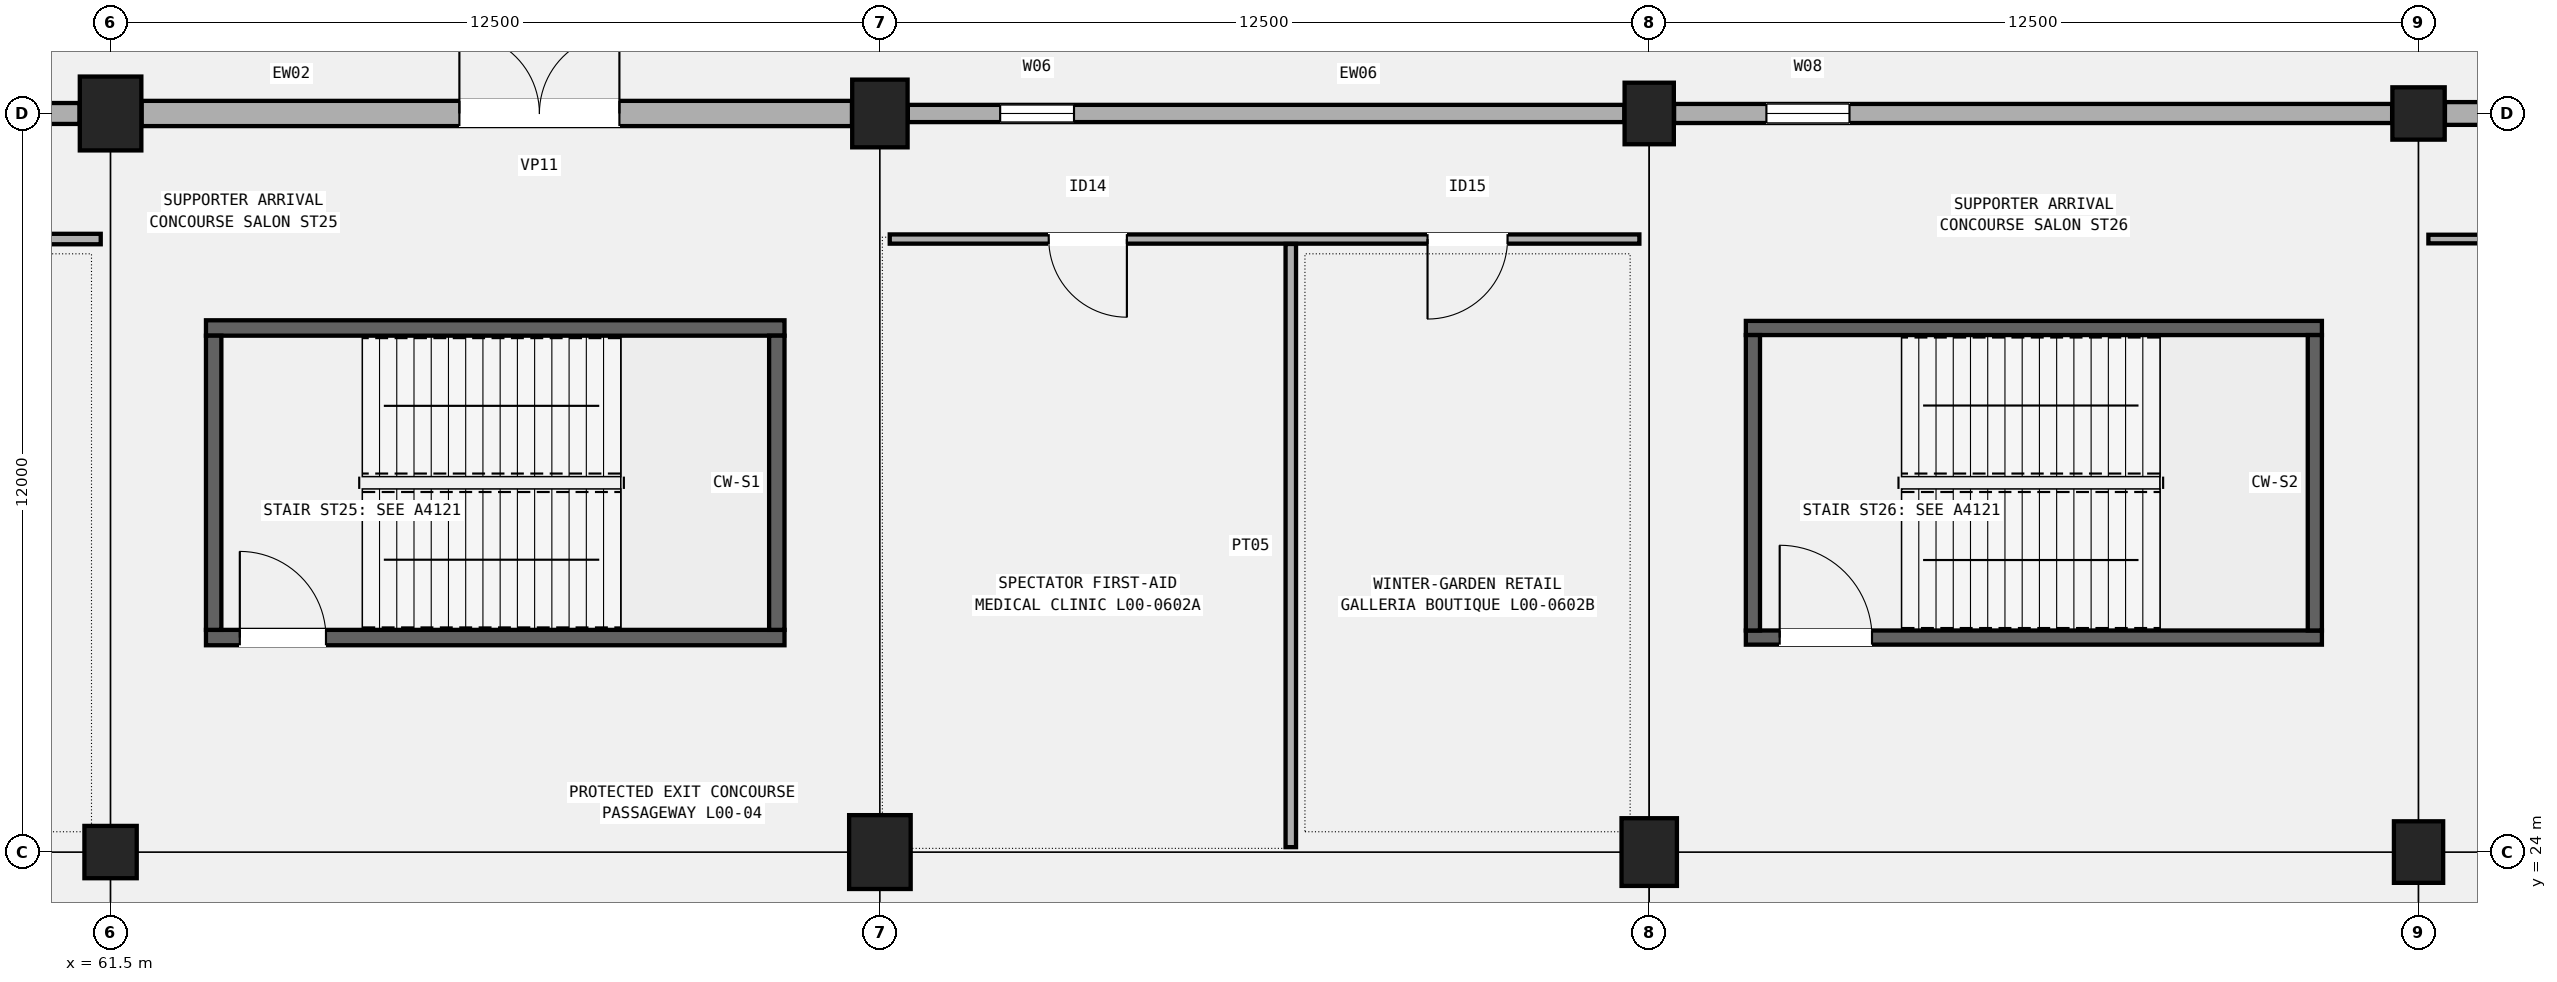
"""IFC4 building model, lengths in metres.
Left out: names, types, materials, properties, quantities, classifications, styles, units other than length and angle.
Written with IfcOpenShell. Run it as: python <this file> out.ifc"""

import sys

from ifc_helpers import new_model, si_unit, direction, frame, frame_2d, origin, origin_2d, place, context, subcontext, project, spatial, rectangle, circle, extrude, element, fill, save


model = new_model("IFC4")
c1 = context("Model", 3, precision=1e-05, world=origin(), true_north=direction((0.0, 1.0)))
c2 = subcontext(c1, "Body", "Model", "MODEL_VIEW")
j1 = project(units=[si_unit("LENGTHUNIT", "METRE"), si_unit("PLANEANGLEUNIT", "RADIAN")], contexts=[c1])
p1 = place(None, origin())
s1 = spatial("IfcSite", under=j1, at=p1, CompositionType="ELEMENT")
p2 = place(p1, origin())
s2 = spatial("IfcBuilding", under=s1, at=p2, CompositionType="ELEMENT")
p3 = place(p2, origin())
s3 = spatial("IfcBuildingStorey", under=s2, at=p3, CompositionType="ELEMENT", Elevation=0.0)
p4 = place(p3, frame((61.5, 24.0, 0.0), z_axis=(0.0, 0.0, 1.0), x_axis=(1.0, 0.0, 0.0)))
e1 = element("IfcColumn", 1, at=p4, inside=s3, PredefinedType="COLUMN", context=c2, shape_type="SweptSolid", body=[
    extrude(circle(Radius=0.425, at=origin_2d()), origin(), (0.0, 0.0, 1.0), 5.4),
])
for number, where, z_axis, x_axis in (
    (2, (61.5, 36.0, 0.0), (0.0, 0.0, 1.0), (1.0, 0.0, 0.0)),
    (3, (74.0, 24.0, 0.0), (0.0, 0.0, 1.0), (1.0, 0.0, 0.0)),
):
    element("IfcColumn", number, at=place(p3, frame(where, z_axis=z_axis, x_axis=x_axis)), inside=s3, PredefinedType="COLUMN", context=c2, shape_type="SweptSolid", body=[
        extrude(rectangle(XDim=1.0, YDim=1.2, at=origin_2d()), origin(), (0.0, 0.0, 1.0), 5.4),
    ])
for number, where, z_axis, x_axis in (
    (4, (74.0, 36.0, 0.0), (0.0, 0.0, 1.0), (1.0, 0.0, 0.0)),
    (5, (86.5, 24.0, 0.0), (0.0, 0.0, 1.0), (1.0, 0.0, 0.0)),
):
    element("IfcColumn", number, at=place(p3, frame(where, z_axis=z_axis, x_axis=x_axis)), inside=s3, PredefinedType="COLUMN", context=c2, shape_type="SweptSolid", body=[
        extrude(rectangle(XDim=0.9, YDim=1.1, at=origin_2d()), origin(), (0.0, 0.0, 1.0), 5.4),
    ])
for number, where, z_axis, x_axis in (
    (6, (86.5, 36.0, 0.0), (0.0, 0.0, 1.0), (1.0, 0.0, 0.0)),
    (7, (99.0, 24.0, 0.0), (0.0, 0.0, 1.0), (1.0, 0.0, 0.0)),
):
    element("IfcColumn", number, at=place(p3, frame(where, z_axis=z_axis, x_axis=x_axis)), inside=s3, PredefinedType="COLUMN", context=c2, shape_type="SweptSolid", body=[
        extrude(rectangle(XDim=0.8, YDim=1.0, at=origin_2d()), origin(), (0.0, 0.0, 1.0), 5.4),
    ])
p5 = place(p3, frame((99.0, 36.0, 0.0), z_axis=(0.0, 0.0, 1.0), x_axis=(1.0, 0.0, 0.0)))
e8 = element("IfcColumn", 8, at=p5, inside=s3, PredefinedType="COLUMN", context=c2, shape_type="SweptSolid", body=[
    extrude(circle(Radius=0.425, at=origin_2d()), origin(), (0.0, 0.0, 1.0), 5.4),
])
p6 = place(p3, frame((49.429, 36.0, 0.0), z_axis=(0.0, 0.0, 1.0), x_axis=(1.0, 0.0, 0.0)))
e9 = element("IfcWall", 9, at=p6, inside=s3, PredefinedType="SOLIDWALL", context=c2, shape_type="SweptSolid", body=[
    extrude(rectangle(XDim=11.567, YDim=0.34, at=frame_2d((5.784, 0.0))), origin(), (0.0, 0.0, 1.0), 4.34),
])
p7 = place(p6, frame((5.177, 0.0, 0.0)))
e10 = element("IfcOpeningElement", 10, at=p7, cuts=e9, PredefinedType="OPENING", context=c2, shape_type="SweptSolid", body=[
    extrude(rectangle(XDim=2.6, YDim=2.5, at=frame_2d((1.3, 1.25))), frame((0.0, 0.18, 0.0), z_axis=(0.0, -1.0, 0.0), x_axis=(1.0, 0.0, 0.0)), (0.0, 0.0, 1.0), 0.36),
])
p8 = place(p3, frame((62.004, 36.0, 0.0), z_axis=(0.0, 0.0, 1.0), x_axis=(1.0, 0.0, 0.0)))
e11 = element("IfcWall", 11, at=p8, inside=s3, PredefinedType="SOLIDWALL", context=c2, shape_type="SweptSolid", body=[
    extrude(rectangle(XDim=11.542, YDim=0.41, at=frame_2d((5.771, 0.0))), origin(), (0.0, 0.0, 1.0), 4.09),
])
p9 = place(p8, frame((5.164, 0.0, 0.0)))
e12 = element("IfcOpeningElement", 12, at=p9, cuts=e11, PredefinedType="OPENING", context=c2, shape_type="SweptSolid", body=[
    extrude(rectangle(XDim=2.6, YDim=2.5, at=frame_2d((1.3, 1.25))), frame((0.0, 0.215, 0.0), z_axis=(0.0, -1.0, 0.0), x_axis=(1.0, 0.0, 0.0)), (0.0, 0.0, 1.0), 0.43),
])
p10 = place(p3, frame((74.454, 36.0, 0.0), z_axis=(0.0, 0.0, 1.0), x_axis=(1.0, 0.0, 0.0)))
e13 = element("IfcWall", 13, at=p10, inside=s3, PredefinedType="SOLIDWALL", context=c2, shape_type="SweptSolid", body=[
    extrude(rectangle(XDim=11.642, YDim=0.28, at=frame_2d((5.821, 0.0))), origin(), (0.0, 0.0, 1.0), 4.24),
])
p11 = place(p10, frame((1.5, 0.0, 0.95)))
e14 = element("IfcOpeningElement", 14, at=p11, cuts=e13, PredefinedType="OPENING", context=c2, shape_type="SweptSolid", body=[
    extrude(rectangle(XDim=1.2, YDim=2.3, at=frame_2d((0.6, 1.15))), frame((0.0, 0.15, 0.0), z_axis=(0.0, -1.0, 0.0), x_axis=(1.0, 0.0, 0.0)), (0.0, 0.0, 1.0), 0.3),
])
p12 = place(p3, frame((86.904, 36.0, 0.0), z_axis=(0.0, 0.0, 1.0), x_axis=(1.0, 0.0, 0.0)))
e15 = element("IfcWall", 15, at=p12, inside=s3, PredefinedType="SOLIDWALL", context=c2, shape_type="SweptSolid", body=[
    extrude(rectangle(XDim=11.667, YDim=0.31, at=frame_2d((5.833, 0.0))), origin(), (0.0, 0.0, 1.0), 4.24),
])
p13 = place(p12, frame((1.5, 0.0, 0.95)))
e16 = element("IfcOpeningElement", 16, at=p13, cuts=e15, PredefinedType="OPENING", context=c2, shape_type="SweptSolid", body=[
    extrude(rectangle(XDim=1.35, YDim=2.4, at=frame_2d((0.675, 1.2))), frame((0.0, 0.165, 0.0), z_axis=(0.0, -1.0, 0.0), x_axis=(1.0, 0.0, 0.0)), (0.0, 0.0, 1.0), 0.33),
])
p14 = place(p3, frame((99.429, 36.0, 0.0), z_axis=(0.0, 0.0, 1.0), x_axis=(1.0, 0.0, 0.0)))
e17 = element("IfcWall", 17, at=p14, inside=s3, PredefinedType="SOLIDWALL", context=c2, shape_type="SweptSolid", body=[
    extrude(rectangle(XDim=12.067, YDim=0.37, at=frame_2d((6.034, 0.0))), origin(), (0.0, 0.0, 1.0), 4.34),
])
p15 = place(p14, frame((1.5, 0.0, 0.95)))
e18 = element("IfcOpeningElement", 18, at=p15, cuts=e17, PredefinedType="OPENING", context=c2, shape_type="SweptSolid", body=[
    extrude(rectangle(XDim=1.5, YDim=2.25, at=frame_2d((0.75, 1.125))), frame((0.0, 0.195, 0.0), z_axis=(0.0, -1.0, 0.0), x_axis=(1.0, 0.0, 0.0)), (0.0, 0.0, 1.0), 0.39),
])
p16 = place(p3, frame((63.05, 27.485, 0.0), z_axis=(0.0, 0.0, 1.0), x_axis=(1.0, 0.0, 0.0)))
e19 = element("IfcWall", 19, at=p16, inside=s3, PredefinedType="SHEAR", context=c2, shape_type="SweptSolid", body=[
    extrude(rectangle(XDim=9.4, YDim=0.25, at=frame_2d((4.7, 0.0))), origin(), (0.0, 0.0, 1.0), 5.14),
])
p17 = place(p16, frame((0.55, 0.0, 0.0)))
e20 = element("IfcOpeningElement", 20, at=p17, cuts=e19, PredefinedType="OPENING", context=c2, shape_type="SweptSolid", body=[
    extrude(rectangle(XDim=1.4, YDim=2.15, at=frame_2d((0.7, 1.075))), frame((0.0, 0.135, 0.0), z_axis=(0.0, -1.0, 0.0), x_axis=(1.0, 0.0, 0.0)), (0.0, 0.0, 1.0), 0.27),
])
p18 = place(p3, frame((63.05, 32.515, 0.0), z_axis=(0.0, 0.0, 1.0), x_axis=(1.0, 0.0, 0.0)))
e21 = element("IfcWall", 21, at=p18, inside=s3, PredefinedType="SHEAR", context=c2, shape_type="SweptSolid", body=[
    extrude(rectangle(XDim=9.4, YDim=0.25, at=frame_2d((4.7, 0.0))), origin(), (0.0, 0.0, 1.0), 5.14),
])
for number, where, z_axis, x_axis in (
    (22, (63.175, 27.61, 0.0), (0.0, 0.0, 1.0), (0.0, 1.0, 0.0)),
    (23, (72.325, 27.61, 0.0), (0.0, 0.0, 1.0), (0.0, 1.0, 0.0)),
):
    element("IfcWall", number, at=place(p3, frame(where, z_axis=z_axis, x_axis=x_axis)), inside=s3, PredefinedType="SHEAR", context=c2, shape_type="SweptSolid", body=[
        extrude(rectangle(XDim=4.78, YDim=0.25, at=frame_2d((2.39, 0.0))), origin(), (0.0, 0.0, 1.0), 5.14),
    ])
p19 = place(p3, frame((88.07, 27.485, 0.0), z_axis=(0.0, 0.0, 1.0), x_axis=(1.0, 0.0, 0.0)))
e24 = element("IfcWall", 24, at=p19, inside=s3, PredefinedType="SHEAR", context=c2, shape_type="SweptSolid", body=[
    extrude(rectangle(XDim=9.36, YDim=0.23, at=frame_2d((4.68, 0.0))), origin(), (0.0, 0.0, 1.0), 5.14),
])
p20 = place(p19, frame((0.55, 0.0, 0.0)))
e25 = element("IfcOpeningElement", 25, at=p20, cuts=e24, PredefinedType="OPENING", context=c2, shape_type="SweptSolid", body=[
    extrude(rectangle(XDim=1.5, YDim=2.2, at=frame_2d((0.75, 1.1))), frame((0.0, 0.125, 0.0), z_axis=(0.0, -1.0, 0.0), x_axis=(1.0, 0.0, 0.0)), (0.0, 0.0, 1.0), 0.25),
])
p21 = place(p3, frame((88.07, 32.515, 0.0), z_axis=(0.0, 0.0, 1.0), x_axis=(1.0, 0.0, 0.0)))
e26 = element("IfcWall", 26, at=p21, inside=s3, PredefinedType="SHEAR", context=c2, shape_type="SweptSolid", body=[
    extrude(rectangle(XDim=9.36, YDim=0.23, at=frame_2d((4.68, 0.0))), origin(), (0.0, 0.0, 1.0), 5.14),
])
for number, where, z_axis, x_axis in (
    (27, (88.185, 27.6, 0.0), (0.0, 0.0, 1.0), (0.0, 1.0, 0.0)),
    (28, (97.315, 27.6, 0.0), (0.0, 0.0, 1.0), (0.0, 1.0, 0.0)),
):
    element("IfcWall", number, at=place(p3, frame(where, z_axis=z_axis, x_axis=x_axis)), inside=s3, PredefinedType="SHEAR", context=c2, shape_type="SweptSolid", body=[
        extrude(rectangle(XDim=4.8, YDim=0.23, at=frame_2d((2.4, 0.0))), origin(), (0.0, 0.0, 1.0), 5.14),
    ])
p22 = place(p3, frame((50.97, 33.96, 0.0), z_axis=(0.0, 0.0, 1.0), x_axis=(1.0, 0.0, 0.0)))
e29 = element("IfcWall", 29, at=p22, inside=s3, PredefinedType="PARTITIONING", context=c2, shape_type="SweptSolid", body=[
    extrude(rectangle(XDim=10.37, YDim=0.17, at=frame_2d((5.185, 0.0))), origin(), (0.0, 0.0, 1.0), 4.52),
])
p23 = place(p22, frame((5.675, 0.0, 0.0), z_axis=(0.0, 0.0, 1.0), x_axis=(-1.0, 0.0, 0.0)))
e30 = element("IfcOpeningElement", 30, at=p23, cuts=e29, PredefinedType="OPENING", context=c2, shape_type="SweptSolid", body=[
    extrude(rectangle(XDim=0.98, YDim=2.1, at=frame_2d((0.49, 1.05))), frame((0.0, 0.095, 0.0), z_axis=(0.0, -1.0, 0.0), x_axis=(1.0, 0.0, 0.0)), (0.0, 0.0, 1.0), 0.19),
])
p24 = place(p3, frame((74.16, 33.96, 0.0), z_axis=(0.0, 0.0, 1.0), x_axis=(1.0, 0.0, 0.0)))
e31 = element("IfcWall", 31, at=p24, inside=s3, PredefinedType="PARTITIONING", context=c2, shape_type="SweptSolid", body=[
    extrude(rectangle(XDim=12.18, YDim=0.15, at=frame_2d((6.09, 0.0))), origin(), (0.0, 0.0, 1.0), 4.52),
])
p25 = place(p24, frame((3.853, 0.0, 0.0), z_axis=(0.0, 0.0, 1.0), x_axis=(-1.0, 0.0, 0.0)))
e32 = element("IfcOpeningElement", 32, at=p25, cuts=e31, PredefinedType="OPENING", context=c2, shape_type="SweptSolid", body=[
    extrude(rectangle(XDim=1.27, YDim=2.2, at=frame_2d((0.635, 1.1))), frame((0.0, 0.085, 0.0), z_axis=(0.0, -1.0, 0.0), x_axis=(1.0, 0.0, 0.0)), (0.0, 0.0, 1.0), 0.17),
])
p26 = place(p24, frame((10.038, 0.0, 0.0), z_axis=(0.0, 0.0, 1.0), x_axis=(-1.0, 0.0, 0.0)))
e33 = element("IfcOpeningElement", 33, at=p26, cuts=e31, PredefinedType="OPENING", context=c2, shape_type="SweptSolid", body=[
    extrude(rectangle(XDim=1.3, YDim=2.24, at=frame_2d((0.65, 1.12))), frame((0.0, 0.085, 0.0), z_axis=(0.0, -1.0, 0.0), x_axis=(1.0, 0.0, 0.0)), (0.0, 0.0, 1.0), 0.17),
])
p27 = place(p3, frame((80.676, 24.08, 0.0), z_axis=(0.0, 0.0, 1.0), x_axis=(0.0, 1.0, 0.0)))
e34 = element("IfcWall", 34, at=p27, inside=s3, PredefinedType="PARTITIONING", context=c2, shape_type="SweptSolid", body=[
    extrude(rectangle(XDim=9.8, YDim=0.17, at=frame_2d((4.9, 0.0))), origin(), (0.0, 0.0, 1.0), 4.52),
])
p28 = place(p3, frame((99.16, 33.96, 0.0), z_axis=(0.0, 0.0, 1.0), x_axis=(1.0, 0.0, 0.0)))
e35 = element("IfcWall", 35, at=p28, inside=s3, PredefinedType="PARTITIONING", context=c2, shape_type="SweptSolid", body=[
    extrude(rectangle(XDim=12.68, YDim=0.14, at=frame_2d((6.34, 0.0))), origin(), (0.0, 0.0, 1.0), 4.52),
])
p29 = place(p28, frame((7.165, 0.0, 0.0), z_axis=(0.0, 0.0, 1.0), x_axis=(-1.0, 0.0, 0.0)))
e36 = element("IfcOpeningElement", 36, at=p29, cuts=e35, PredefinedType="OPENING", context=c2, shape_type="SweptSolid", body=[
    extrude(rectangle(XDim=1.65, YDim=2.28, at=frame_2d((0.825, 1.14))), frame((0.0, 0.08, 0.0), z_axis=(0.0, -1.0, 0.0), x_axis=(1.0, 0.0, 0.0)), (0.0, 0.0, 1.0), 0.16),
])
p30 = place(p9, origin())
e37 = element("IfcDoor", 37, at=p30, inside=s3, OperationType="DOUBLE_DOOR_SINGLE_SWING", PredefinedType="DOOR", context=c2, shape_type="SweptSolid", body=[
    extrude(rectangle(XDim=2.6, YDim=2.5, at=frame_2d((1.3, 1.25))), frame((0.0, 0.025, 0.0), z_axis=(0.0, -1.0, 0.0), x_axis=(1.0, 0.0, 0.0)), (0.0, 0.0, 1.0), 0.05),
])
fill(e12, e37)
p31 = place(p11, origin())
e38 = element("IfcWindow", 38, at=p31, inside=s3, PartitioningType="SINGLE_PANEL", PredefinedType="WINDOW", context=c2, shape_type="SweptSolid", body=[
    extrude(rectangle(XDim=1.2, YDim=2.3, at=frame_2d((0.6, 1.15))), frame((0.0, 0.03, 0.0), z_axis=(0.0, -1.0, 0.0), x_axis=(1.0, 0.0, 0.0)), (0.0, 0.0, 1.0), 0.06),
])
fill(e14, e38)
p32 = place(p13, origin())
e39 = element("IfcWindow", 39, at=p32, inside=s3, PartitioningType="SINGLE_PANEL", PredefinedType="WINDOW", context=c2, shape_type="SweptSolid", body=[
    extrude(rectangle(XDim=1.35, YDim=2.4, at=frame_2d((0.675, 1.2))), frame((0.0, 0.03, 0.0), z_axis=(0.0, -1.0, 0.0), x_axis=(1.0, 0.0, 0.0)), (0.0, 0.0, 1.0), 0.06),
])
fill(e16, e39)
p33 = place(p17, origin())
e40 = element("IfcDoor", 40, at=p33, inside=s3, OperationType="SINGLE_SWING_LEFT", PredefinedType="DOOR", context=c2, shape_type="SweptSolid", body=[
    extrude(rectangle(XDim=1.4, YDim=2.15, at=frame_2d((0.7, 1.075))), frame((0.0, 0.025, 0.0), z_axis=(0.0, -1.0, 0.0), x_axis=(1.0, 0.0, 0.0)), (0.0, 0.0, 1.0), 0.05),
])
fill(e20, e40)
p34 = place(p20, origin())
e41 = element("IfcDoor", 41, at=p34, inside=s3, OperationType="SINGLE_SWING_LEFT", PredefinedType="DOOR", context=c2, shape_type="SweptSolid", body=[
    extrude(rectangle(XDim=1.5, YDim=2.2, at=frame_2d((0.75, 1.1))), frame((0.0, 0.025, 0.0), z_axis=(0.0, -1.0, 0.0), x_axis=(1.0, 0.0, 0.0)), (0.0, 0.0, 1.0), 0.05),
])
fill(e25, e41)
p35 = place(p25, origin())
e42 = element("IfcDoor", 42, at=p35, inside=s3, OperationType="SINGLE_SWING_LEFT", PredefinedType="DOOR", context=c2, shape_type="SweptSolid", body=[
    extrude(rectangle(XDim=1.27, YDim=2.2, at=frame_2d((0.635, 1.1))), frame((0.0, 0.025, 0.0), z_axis=(0.0, -1.0, 0.0), x_axis=(1.0, 0.0, 0.0)), (0.0, 0.0, 1.0), 0.05),
])
fill(e32, e42)
p36 = place(p26, origin())
e43 = element("IfcDoor", 43, at=p36, inside=s3, OperationType="SINGLE_SWING_RIGHT", PredefinedType="DOOR", context=c2, shape_type="SweptSolid", body=[
    extrude(rectangle(XDim=1.3, YDim=2.24, at=frame_2d((0.65, 1.12))), frame((0.0, 0.025, 0.0), z_axis=(0.0, -1.0, 0.0), x_axis=(1.0, 0.0, 0.0)), (0.0, 0.0, 1.0), 0.05),
])
fill(e33, e43)
save(model, sys.argv[1])
